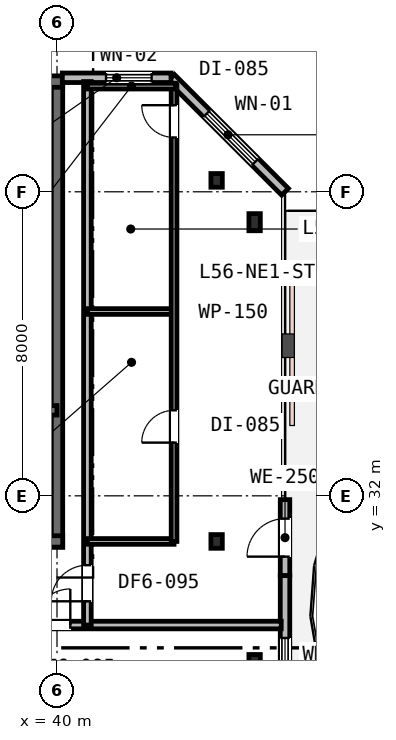
"""IFC4 building model, lengths in metres.
Left out: names, types, materials, properties, quantities, classifications, styles, units other than length and angle.
Written with IfcOpenShell. Run it as: python <this file> out.ifc"""

import sys

from ifc_helpers import new_model, si_unit, direction, frame, frame_2d, origin, origin_2d, place, context, subcontext, project, spatial, rectangle, i_section, extrude, element, fill, save


model = new_model("IFC4")
c1 = context("Model", 3, precision=1e-05, world=origin(), true_north=direction((0.0, 1.0)))
c2 = subcontext(c1, "Body", "Model", "MODEL_VIEW")
j1 = project(units=[si_unit("LENGTHUNIT", "METRE"), si_unit("PLANEANGLEUNIT", "RADIAN")], contexts=[c1])
p1 = place(None, origin())
s1 = spatial("IfcSite", under=j1, at=p1, CompositionType="ELEMENT")
p2 = place(p1, origin())
s2 = spatial("IfcBuilding", under=s1, at=p2, CompositionType="ELEMENT")
p3 = place(p2, frame((0.0, 0.0, 218.4)))
s3 = spatial("IfcBuildingStorey", under=s2, at=p3, CompositionType="ELEMENT", Elevation=218.4)
p4 = place(p3, frame((40.0, 30.65, 0.0), z_axis=(0.0, 0.0, 1.0), x_axis=(0.0, 1.0, 0.0)))
e1 = element("IfcWall", 1, at=p4, inside=s3, PredefinedType="SHEAR", context=c2, shape_type="SweptSolid", body=[
    extrude(rectangle(XDim=12.3, YDim=0.3, at=frame_2d((6.15, 0.0))), origin(), (0.0, 0.0, 1.0), 3.8),
])
p5 = place(p3, frame((15.85, 42.9, 0.0), z_axis=(0.0, 0.0, 1.0), x_axis=(1.0, 0.0, 0.0)))
e2 = element("IfcWall", 2, at=p5, inside=s3, PredefinedType="SHEAR", context=c2, shape_type="SweptSolid", body=[
    extrude(rectangle(XDim=24.3, YDim=0.3, at=frame_2d((12.15, 0.0))), origin(), (0.0, 0.0, 1.0), 3.8),
])
p6 = place(p3, frame((28.95, 30.8, 0.0), z_axis=(0.0, 0.0, 1.0), x_axis=(1.0, 0.0, 0.0)))
e3 = element("IfcWall", 3, at=p6, inside=s3, PredefinedType="SHEAR", context=c2, shape_type="SweptSolid", body=[
    extrude(rectangle(XDim=11.2, YDim=0.3, at=frame_2d((5.6, 0.0))), origin(), (0.0, 0.0, 1.0), 3.8),
])
p7 = place(p6, frame((7.65, 0.0, 0.0)))
e4 = element("IfcOpeningElement", 4, at=p7, cuts=e3, PredefinedType="OPENING", context=c2, shape_type="SweptSolid", body=[
    extrude(rectangle(XDim=1.1, YDim=2.15, at=frame_2d((0.55, 1.075))), frame((0.0, 0.16, 0.0), z_axis=(0.0, -1.0, 0.0), x_axis=(1.0, 0.0, 0.0)), (0.0, 0.0, 1.0), 0.32),
])
p8 = place(p3, frame((33.95, 34.25, 0.0), z_axis=(0.0, 0.0, 1.0), x_axis=(1.0, 0.0, 0.0)))
e5 = element("IfcWall", 5, at=p8, inside=s3, PredefinedType="SHEAR", context=c2, shape_type="SweptSolid", body=[
    extrude(rectangle(XDim=6.05, YDim=0.25, at=frame_2d((3.025, 0.0))), origin(), (0.0, 0.0, 1.0), 3.8),
])
p9 = place(p8, frame((3.7, 0.0, 0.0)))
e6 = element("IfcOpeningElement", 6, at=p9, cuts=e5, PredefinedType="OPENING", context=c2, shape_type="SweptSolid", body=[
    extrude(rectangle(XDim=1.0, YDim=2.15, at=frame_2d((0.5, 1.075))), frame((0.0, 0.135, 0.0), z_axis=(0.0, -1.0, 0.0), x_axis=(1.0, 0.0, 0.0)), (0.0, 0.0, 1.0), 0.27),
])
p10 = place(p8, frame((0.55, 0.0, 0.0)))
e7 = element("IfcOpeningElement", 7, at=p10, cuts=e5, PredefinedType="OPENING", context=c2, shape_type="SweptSolid", body=[
    extrude(rectangle(XDim=1.1, YDim=2.15, at=frame_2d((0.55, 1.075))), frame((0.0, 0.135, 0.0), z_axis=(0.0, -1.0, 0.0), x_axis=(1.0, 0.0, 0.0)), (0.0, 0.0, 1.0), 0.27),
])
for number, where, z_axis, x_axis in (
    (8, (45.2, 27.6, 0.0), (0.0, 0.0, 1.0), (1.0, 0.0, 0.0)),
    (9, (45.2, 39.2, 0.0), (0.0, 0.0, 1.0), (1.0, 0.0, 0.0)),
):
    element("IfcColumn", number, at=place(p3, frame(where, z_axis=z_axis, x_axis=x_axis)), inside=s3, PredefinedType="COLUMN", context=c2, shape_type="SweptSolid", body=[
        extrude(i_section(OverallWidth=0.3, OverallDepth=0.45, WebThickness=0.014, FlangeThickness=0.026, FilletRadius=0.027, at=origin_2d()), origin(), (0.0, 0.0, 1.0), 3.8),
    ])
for number, where, z_axis, x_axis in (
    (10, (44.2, 30.8, 0.0), (0.0, 0.0, 1.0), (1.0, 0.0, 0.0)),
    (11, (44.2, 40.3, 0.0), (0.0, 0.0, 1.0), (1.0, 0.0, 0.0)),
):
    element("IfcColumn", number, at=place(p3, frame(where, z_axis=z_axis, x_axis=x_axis)), inside=s3, PredefinedType="COLUMN", context=c2, shape_type="SweptSolid", body=[
        extrude(i_section(OverallWidth=0.3, OverallDepth=0.36, WebThickness=0.013, FlangeThickness=0.022, FilletRadius=0.027, at=origin_2d()), origin(), (0.0, 0.0, 1.0), 3.8),
    ])
p11 = place(p3, frame((46.0, 29.9, 0.0), z_axis=(0.0, 0.0, 1.0), x_axis=(0.0, 1.0, 0.0)))
e12 = element("IfcWall", 12, at=p11, inside=s3, PredefinedType="STANDARD", context=c2, shape_type="SweptSolid", body=[
    extrude(rectangle(XDim=2.0, YDim=0.25, at=frame_2d((1.0, 0.0))), origin(), (0.0, 0.0, 1.0), 3.53),
])
p12 = place(p11, frame((0.5, 0.0, 0.0)))
e13 = element("IfcOpeningElement", 13, at=p12, cuts=e12, PredefinedType="OPENING", context=c2, shape_type="SweptSolid", body=[
    extrude(rectangle(XDim=1.0, YDim=2.15, at=frame_2d((0.5, 1.075))), frame((0.0, 0.135, 0.0), z_axis=(0.0, -1.0, 0.0), x_axis=(1.0, 0.0, 0.0)), (0.0, 0.0, 1.0), 0.27),
])
p13 = place(p3, frame((46.0, 27.0, 0.0), z_axis=(0.0, 0.0, 1.0), x_axis=(0.0, 1.0, 0.0)))
e14 = element("IfcWall", 14, at=p13, inside=s3, PredefinedType="STANDARD", context=c2, shape_type="SweptSolid", body=[
    extrude(rectangle(XDim=2.9, YDim=0.25, at=frame_2d((1.45, 0.0))), origin(), (0.0, 0.0, 1.0), 3.53),
])
p14 = place(p13, frame((0.36, 0.0, 0.9)))
e15 = element("IfcOpeningElement", 15, at=p14, cuts=e14, PredefinedType="OPENING", context=c2, shape_type="SweptSolid", body=[
    extrude(rectangle(XDim=0.9, YDim=1.55, at=frame_2d((0.45, 0.775))), frame((0.0, 0.135, 0.0), z_axis=(0.0, -1.0, 0.0), x_axis=(1.0, 0.0, 0.0)), (0.0, 0.0, 1.0), 0.27),
])
p15 = place(p3, frame((46.0, 40.0, 0.0), z_axis=(0.0, 0.0, 1.0), x_axis=(-0.707106781187, 0.707106781187, 0.0)))
e16 = element("IfcWall", 16, at=p15, inside=s3, PredefinedType="STANDARD", context=c2, shape_type="SweptSolid", body=[
    extrude(rectangle(XDim=4.243, YDim=0.25, at=frame_2d((2.121, 0.0))), origin(), (0.0, 0.0, 1.0), 3.53),
])
p16 = place(p15, frame((1.111, 0.0, 0.75)))
e17 = element("IfcOpeningElement", 17, at=p16, cuts=e16, PredefinedType="OPENING", context=c2, shape_type="SweptSolid", body=[
    extrude(rectangle(XDim=1.8, YDim=1.85, at=frame_2d((0.9, 0.925))), frame((0.0, 0.135, 0.0), z_axis=(0.0, -1.0, 0.0), x_axis=(1.0, 0.0, 0.0)), (0.0, 0.0, 1.0), 0.27),
])
p17 = place(p3, frame((43.0, 43.0, 0.0), z_axis=(0.0, 0.0, 1.0), x_axis=(-1.0, 0.0, 0.0)))
e18 = element("IfcWall", 18, at=p17, inside=s3, PredefinedType="STANDARD", context=c2, shape_type="SweptSolid", body=[
    extrude(rectangle(XDim=2.86, YDim=0.25, at=frame_2d((1.43, 0.0))), origin(), (0.0, 0.0, 1.0), 3.53),
])
p18 = place(p17, frame((0.51, 0.0, 0.85)))
e19 = element("IfcOpeningElement", 19, at=p18, cuts=e18, PredefinedType="OPENING", context=c2, shape_type="SweptSolid", body=[
    extrude(rectangle(XDim=1.2, YDim=1.6, at=frame_2d((0.6, 0.8))), frame((0.0, 0.135, 0.0), z_axis=(0.0, -1.0, 0.0), x_axis=(1.0, 0.0, 0.0)), (0.0, 0.0, 1.0), 0.27),
])
p19 = place(p3, frame((13.6, 28.6, 0.0), z_axis=(0.0, 0.0, 1.0), x_axis=(1.0, 0.0, 0.0)))
e20 = element("IfcWall", 20, at=p19, inside=s3, PredefinedType="PARTITIONING", context=c2, shape_type="SweptSolid", body=[
    extrude(rectangle(XDim=32.3, YDim=0.2, at=frame_2d((16.15, 0.0))), origin(), (0.0, 0.0, 1.0), 2.92),
])
p20 = place(p19, frame((11.787, 0.0, 0.0)))
e21 = element("IfcOpeningElement", 21, at=p20, cuts=e20, PredefinedType="OPENING", context=c2, shape_type="SweptSolid", body=[
    extrude(rectangle(XDim=0.95, YDim=2.15, at=frame_2d((0.475, 1.075))), frame((0.0, 0.11, 0.0), z_axis=(0.0, -1.0, 0.0), x_axis=(1.0, 0.0, 0.0)), (0.0, 0.0, 1.0), 0.22),
])
p21 = place(p19, frame((25.8, 0.0, 0.0)))
e22 = element("IfcOpeningElement", 22, at=p21, cuts=e20, PredefinedType="OPENING", context=c2, shape_type="SweptSolid", body=[
    extrude(rectangle(XDim=0.95, YDim=2.15, at=frame_2d((0.475, 1.075))), frame((0.0, 0.11, 0.0), z_axis=(0.0, -1.0, 0.0), x_axis=(1.0, 0.0, 0.0)), (0.0, 0.0, 1.0), 0.22),
])
p22 = place(p3, frame((40.8, 28.6, 0.0), z_axis=(0.0, 0.0, 1.0), x_axis=(0.0, 1.0, 0.0)))
e23 = element("IfcWall", 23, at=p22, inside=s3, PredefinedType="PARTITIONING", context=c2, shape_type="SweptSolid", body=[
    extrude(rectangle(XDim=14.3, YDim=0.2, at=frame_2d((7.15, 0.0))), origin(), (0.0, 0.0, 1.0), 2.92),
])
p23 = place(p22, frame((0.625, 0.0, 0.0)))
e24 = element("IfcOpeningElement", 24, at=p23, cuts=e23, PredefinedType="OPENING", context=c2, shape_type="SweptSolid", body=[
    extrude(rectangle(XDim=0.95, YDim=2.15, at=frame_2d((0.475, 1.075))), frame((0.0, 0.11, 0.0), z_axis=(0.0, -1.0, 0.0), x_axis=(1.0, 0.0, 0.0)), (0.0, 0.0, 1.0), 0.22),
])
p24 = place(p3, frame((40.8, 30.8, 0.0), z_axis=(0.0, 0.0, 1.0), x_axis=(1.0, 0.0, 0.0)))
e25 = element("IfcWall", 25, at=p24, inside=s3, PredefinedType="PARTITIONING", context=c2, shape_type="SweptSolid", body=[
    extrude(rectangle(XDim=2.28, YDim=0.15, at=frame_2d((1.14, 0.0))), origin(), (0.0, 0.0, 1.0), 2.92),
])
p25 = place(p3, frame((40.8, 36.85, 0.0), z_axis=(0.0, 0.0, 1.0), x_axis=(1.0, 0.0, 0.0)))
e26 = element("IfcWall", 26, at=p25, inside=s3, PredefinedType="PARTITIONING", context=c2, shape_type="SweptSolid", body=[
    extrude(rectangle(XDim=2.28, YDim=0.15, at=frame_2d((1.14, 0.0))), origin(), (0.0, 0.0, 1.0), 3.53),
])
p26 = place(p3, frame((43.08, 30.8, 0.0), z_axis=(0.0, 0.0, 1.0), x_axis=(0.0, 1.0, 0.0)))
e27 = element("IfcWall", 27, at=p26, inside=s3, PredefinedType="PARTITIONING", context=c2, shape_type="SweptSolid", body=[
    extrude(rectangle(XDim=12.02, YDim=0.15, at=frame_2d((6.01, 0.0))), origin(), (0.0, 0.0, 1.0), 2.92),
])
p27 = place(p26, frame((2.6, 0.0, 0.0)))
e28 = element("IfcOpeningElement", 28, at=p27, cuts=e27, PredefinedType="OPENING", context=c2, shape_type="SweptSolid", body=[
    extrude(rectangle(XDim=0.85, YDim=2.15, at=frame_2d((0.425, 1.075))), frame((0.0, 0.085, 0.0), z_axis=(0.0, -1.0, 0.0), x_axis=(1.0, 0.0, 0.0)), (0.0, 0.0, 1.0), 0.17),
])
p28 = place(p26, frame((10.629, 0.0, 0.0)))
e29 = element("IfcOpeningElement", 29, at=p28, cuts=e27, PredefinedType="OPENING", context=c2, shape_type="SweptSolid", body=[
    extrude(rectangle(XDim=0.85, YDim=2.15, at=frame_2d((0.425, 1.075))), frame((0.0, 0.085, 0.0), z_axis=(0.0, -1.0, 0.0), x_axis=(1.0, 0.0, 0.0)), (0.0, 0.0, 1.0), 0.17),
])
p29 = place(p3, frame((40.8, 42.78, 0.0), z_axis=(0.0, 0.0, 1.0), x_axis=(1.0, 0.0, 0.0)))
e30 = element("IfcWall", 30, at=p29, inside=s3, PredefinedType="PARTITIONING", context=c2, shape_type="SweptSolid", body=[
    extrude(rectangle(XDim=2.32, YDim=0.15, at=frame_2d((1.16, 0.0))), origin(), (0.0, 0.0, 1.0), 3.53),
])
p30 = place(p12, origin())
e31 = element("IfcDoor", 31, at=p30, inside=s3, OperationType="SINGLE_SWING_LEFT", PredefinedType="DOOR", context=c2, shape_type="SweptSolid", body=[
    extrude(rectangle(XDim=1.0, YDim=2.15, at=frame_2d((0.5, 1.075))), frame((0.0, 0.025, 0.0), z_axis=(0.0, -1.0, 0.0), x_axis=(1.0, 0.0, 0.0)), (0.0, 0.0, 1.0), 0.05),
])
fill(e13, e31)
p31 = place(p14, origin())
e32 = element("IfcWindow", 32, at=p31, inside=s3, PartitioningType="SINGLE_PANEL", PredefinedType="WINDOW", context=c2, shape_type="SweptSolid", body=[
    extrude(rectangle(XDim=0.9, YDim=1.55, at=frame_2d((0.45, 0.775))), frame((0.0, 0.03, 0.0), z_axis=(0.0, -1.0, 0.0), x_axis=(1.0, 0.0, 0.0)), (0.0, 0.0, 1.0), 0.06),
])
fill(e15, e32)
p32 = place(p16, origin())
e33 = element("IfcWindow", 33, at=p32, inside=s3, PartitioningType="SINGLE_PANEL", PredefinedType="WINDOW", context=c2, shape_type="SweptSolid", body=[
    extrude(rectangle(XDim=1.8, YDim=1.85, at=frame_2d((0.9, 0.925))), frame((0.0, 0.03, 0.0), z_axis=(0.0, -1.0, 0.0), x_axis=(1.0, 0.0, 0.0)), (0.0, 0.0, 1.0), 0.06),
])
fill(e17, e33)
p33 = place(p18, origin())
e34 = element("IfcWindow", 34, at=p33, inside=s3, PartitioningType="SINGLE_PANEL", PredefinedType="WINDOW", context=c2, shape_type="SweptSolid", body=[
    extrude(rectangle(XDim=1.2, YDim=1.6, at=frame_2d((0.6, 0.8))), frame((0.0, 0.03, 0.0), z_axis=(0.0, -1.0, 0.0), x_axis=(1.0, 0.0, 0.0)), (0.0, 0.0, 1.0), 0.06),
])
fill(e19, e34)
p34 = place(p23, origin())
e35 = element("IfcDoor", 35, at=p34, inside=s3, OperationType="SINGLE_SWING_LEFT", PredefinedType="DOOR", context=c2, shape_type="SweptSolid", body=[
    extrude(rectangle(XDim=0.95, YDim=2.15, at=frame_2d((0.475, 1.075))), frame((0.0, 0.025, 0.0), z_axis=(0.0, -1.0, 0.0), x_axis=(1.0, 0.0, 0.0)), (0.0, 0.0, 1.0), 0.05),
])
fill(e24, e35)
p35 = place(p27, origin())
e36 = element("IfcDoor", 36, at=p35, inside=s3, OperationType="SINGLE_SWING_LEFT", PredefinedType="DOOR", context=c2, shape_type="SweptSolid", body=[
    extrude(rectangle(XDim=0.85, YDim=2.15, at=frame_2d((0.425, 1.075))), frame((0.0, 0.025, 0.0), z_axis=(0.0, -1.0, 0.0), x_axis=(1.0, 0.0, 0.0)), (0.0, 0.0, 1.0), 0.05),
])
fill(e28, e36)
p36 = place(p28, origin())
e37 = element("IfcDoor", 37, at=p36, inside=s3, OperationType="SINGLE_SWING_RIGHT", PredefinedType="DOOR", context=c2, shape_type="SweptSolid", body=[
    extrude(rectangle(XDim=0.85, YDim=2.15, at=frame_2d((0.425, 1.075))), frame((0.0, 0.025, 0.0), z_axis=(0.0, -1.0, 0.0), x_axis=(1.0, 0.0, 0.0)), (0.0, 0.0, 1.0), 0.05),
])
fill(e29, e37)
p37 = place(p21, origin())
e38 = element("IfcDoor", 38, at=p37, inside=s3, OperationType="SINGLE_SWING_RIGHT", PredefinedType="DOOR", context=c2, shape_type="SweptSolid", body=[
    extrude(rectangle(XDim=0.95, YDim=2.15, at=frame_2d((0.475, 1.075))), frame((0.0, 0.025, 0.0), z_axis=(0.0, -1.0, 0.0), x_axis=(1.0, 0.0, 0.0)), (0.0, 0.0, 1.0), 0.05),
])
fill(e22, e38)
save(model, sys.argv[1])
